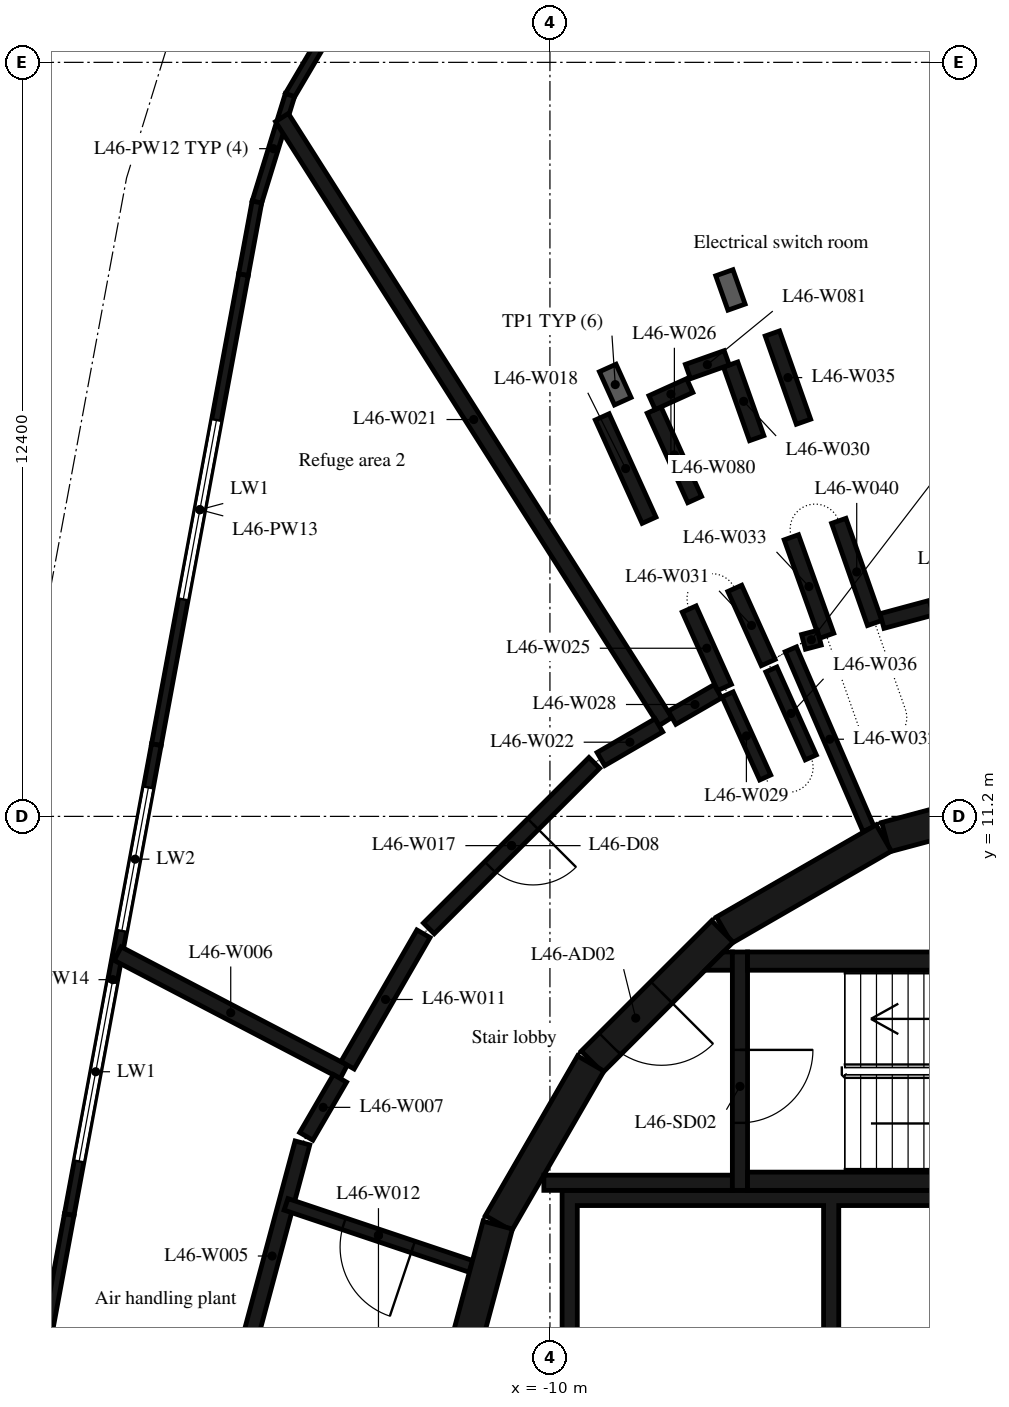
"""IFC4 building model, lengths in metres.
Left out: names, types, materials, properties, quantities, classifications, styles, units other than length and angle.
Written with IfcOpenShell. Run it as: python <this file> out.ifc"""

import sys

from ifc_helpers import new_model, si_unit, direction, frame, frame_2d, origin, place, context, subcontext, project, spatial, polyline, rectangle, outline, extrude, element, fill, save


model = new_model("IFC4")
c1 = context("Model", 3, precision=1e-05, world=origin(), true_north=direction((0.0, 1.0)))
c2 = subcontext(c1, "Body", "Model", "MODEL_VIEW")
j1 = project(units=[si_unit("LENGTHUNIT", "METRE"), si_unit("PLANEANGLEUNIT", "RADIAN")], contexts=[c1])
p1 = place(None, origin())
s1 = spatial("IfcSite", under=j1, at=p1, CompositionType="ELEMENT")
p2 = place(p1, origin())
s2 = spatial("IfcBuilding", under=s1, at=p2, CompositionType="ELEMENT")
p3 = place(p2, frame((0.0, 0.0, 183.2)))
s3 = spatial("IfcBuildingStorey", under=s2, at=p3, CompositionType="ELEMENT", Elevation=183.2)
p4 = place(p3, frame((-13.341, 24.646, 0.0), z_axis=(0.0, 0.0, 1.0), x_axis=(-0.50746464076, -0.861672581889, 0.0)))
e1 = element("IfcWall", 1, at=p4, inside=s3, PredefinedType="STANDARD", context=c2, shape_type="SweptSolid", body=[
    extrude(rectangle(XDim=1.848, YDim=0.16, at=frame_2d((0.924, 0.0))), origin(), (0.0, 0.0, 1.0), 4.75),
])
p5 = place(p3, frame((-14.275, 23.062, 0.0), z_axis=(0.0, 0.0, 1.0), x_axis=(-0.295200909257, -0.955435200929, 0.0)))
e2 = element("IfcWall", 2, at=p5, inside=s3, PredefinedType="STANDARD", context=c2, shape_type="SweptSolid", body=[
    extrude(rectangle(XDim=1.846, YDim=0.16, at=frame_2d((0.923, 0.0))), origin(), (0.0, 0.0, 1.0), 4.75),
])
p6 = place(p3, frame((-14.819, 21.303, 0.0), z_axis=(0.0, 0.0, 1.0), x_axis=(-0.182153983932, -0.983270016902, 0.0)))
e3 = element("IfcWall", 3, at=p6, inside=s3, PredefinedType="STANDARD", context=c2, shape_type="SweptSolid", body=[
    extrude(rectangle(XDim=1.216, YDim=0.16, at=frame_2d((0.608, 0.0))), origin(), (0.0, 0.0, 1.0), 4.75),
])
p7 = place(p3, frame((-15.041, 20.108, 0.0), z_axis=(0.0, 0.0, 1.0), x_axis=(-0.182238304251, -0.983254392547, 0.0)))
e4 = element("IfcWall", 4, at=p7, inside=s3, PredefinedType="STANDARD", context=c2, shape_type="SweptSolid", body=[
    extrude(rectangle(XDim=7.86, YDim=0.16, at=frame_2d((3.93, 0.0))), origin(), (0.0, 0.0, 1.0), 4.75),
])
p8 = place(p7, frame((2.43, 0.0, 1.0)))
e5 = element("IfcOpeningElement", 5, at=p8, cuts=e4, PredefinedType="OPENING", context=c2, shape_type="SweptSolid", body=[
    extrude(rectangle(XDim=3.0, YDim=2.2, at=frame_2d((1.5, 1.1))), frame((0.0, 0.09, 0.0), z_axis=(0.0, -1.0, 0.0), x_axis=(1.0, 0.0, 0.0)), (0.0, 0.0, 1.0), 0.18),
])
p9 = place(p3, frame((-16.473, 12.379, 0.0), z_axis=(0.0, 0.0, 1.0), x_axis=(-0.182232738599, -0.98325542408, 0.0)))
e6 = element("IfcWall", 6, at=p9, inside=s3, PredefinedType="STANDARD", context=c2, shape_type="SweptSolid", body=[
    extrude(rectangle(XDim=7.86, YDim=0.16, at=frame_2d((3.93, 0.0))), origin(), (0.0, 0.0, 1.0), 4.75),
])
p10 = place(p9, frame((0.715, 0.0, 1.0)))
e7 = element("IfcOpeningElement", 7, at=p10, cuts=e6, PredefinedType="OPENING", context=c2, shape_type="SweptSolid", body=[
    extrude(rectangle(XDim=2.4, YDim=2.2, at=frame_2d((1.2, 1.1))), frame((0.0, 0.09, 0.0), z_axis=(0.0, -1.0, 0.0), x_axis=(1.0, 0.0, 0.0)), (0.0, 0.0, 1.0), 0.18),
])
p11 = place(p9, frame((3.97, 0.0, 1.0)))
e8 = element("IfcOpeningElement", 8, at=p11, cuts=e6, PredefinedType="OPENING", context=c2, shape_type="SweptSolid", body=[
    extrude(rectangle(XDim=3.0, YDim=2.2, at=frame_2d((1.5, 1.1))), frame((0.0, 0.09, 0.0), z_axis=(0.0, -1.0, 0.0), x_axis=(1.0, 0.0, 0.0)), (0.0, 0.0, 1.0), 0.18),
])
p12 = place(p3, frame((-17.905, 4.651, 0.0), z_axis=(0.0, 0.0, 1.0), x_axis=(-0.182232738599, -0.98325542408, 0.0)))
e9 = element("IfcWall", 9, at=p12, inside=s3, PredefinedType="STANDARD", context=c2, shape_type="SweptSolid", body=[
    extrude(rectangle(XDim=7.86, YDim=0.16, at=frame_2d((3.93, 0.0))), origin(), (0.0, 0.0, 1.0), 4.75),
])
for number, where, z_axis, x_axis in (
    (10, (-1.55, 11.643, 0.0), (0.0, 0.0, 1.0), (-0.966, -0.259, 0.0)),
    (11, (-4.51, 10.845, 0.0), (0.0, 0.0, 1.0), (-0.866, -0.5, 0.0)),
):
    element("IfcWall", number, at=place(p3, frame(where, z_axis=z_axis, x_axis=x_axis)), inside=s3, PredefinedType="SHEAR", context=c2, shape_type="SweptSolid", body=[
        extrude(rectangle(XDim=3.033, YDim=0.5, at=frame_2d((1.516, 0.0))), origin(), (0.0, 0.0, 1.0), 4.75),
    ])
p13 = place(p3, frame((-7.164, 9.308, 0.0), z_axis=(0.0, 0.0, 1.0), x_axis=(-0.707106781187, -0.707106781187, 0.0)))
e12 = element("IfcWall", 12, at=p13, inside=s3, PredefinedType="SHEAR", context=c2, shape_type="SweptSolid", body=[
    extrude(rectangle(XDim=3.032, YDim=0.5, at=frame_2d((1.516, 0.0))), origin(), (0.0, 0.0, 1.0), 4.75),
])
p14 = place(p13, frame((1.416, 0.0, 0.0)))
e13 = element("IfcOpeningElement", 13, at=p14, cuts=e12, PredefinedType="OPENING", context=c2, shape_type="SweptSolid", body=[
    extrude(rectangle(XDim=1.2, YDim=2.1, at=frame_2d((0.6, 1.05))), frame((0.0, 0.26, 0.0), z_axis=(0.0, -1.0, 0.0), x_axis=(1.0, 0.0, 0.0)), (0.0, 0.0, 1.0), 0.52),
])
for number, where, z_axis, x_axis in (
    (14, (-9.329, 7.137, 0.0), (0.0, 0.0, 1.0), (-0.5, -0.866, 0.0)),
    (15, (-10.858, 4.479, 0.0), (0.0, 0.0, 1.0), (-0.259, -0.966, 0.0)),
):
    element("IfcWall", number, at=place(p3, frame(where, z_axis=z_axis, x_axis=x_axis)), inside=s3, PredefinedType="SHEAR", context=c2, shape_type="SweptSolid", body=[
        extrude(rectangle(XDim=3.033, YDim=0.5, at=frame_2d((1.516, 0.0))), origin(), (0.0, 0.0, 1.0), 4.75),
    ])
for number, where, z_axis, x_axis in (
    (16, (-6.75, 5.2, 0.0), (0.0, 0.0, 1.0), (1.0, 0.0, 0.0)),
    (17, (-6.75, 8.82, 0.0), (0.0, 0.0, 1.0), (1.0, 0.0, 0.0)),
):
    element("IfcWall", number, at=place(p3, frame(where, z_axis=z_axis, x_axis=x_axis)), inside=s3, PredefinedType="SHEAR", context=c2, shape_type="SweptSolid", body=[
        extrude(rectangle(XDim=6.75, YDim=0.3, at=frame_2d((3.375, 0.0))), origin(), (0.0, 0.0, 1.0), 4.75),
    ])
p15 = place(p3, frame((-6.875, 8.97, 0.0), z_axis=(0.0, 0.0, 1.0), x_axis=(0.0, -1.0, 0.0)))
e18 = element("IfcWall", 18, at=p15, inside=s3, PredefinedType="SHEAR", context=c2, shape_type="SweptSolid", body=[
    extrude(rectangle(XDim=3.92, YDim=0.25, at=frame_2d((1.96, 0.0))), origin(), (0.0, 0.0, 1.0), 4.75),
])
p16 = place(p15, frame((1.61, 0.0, 0.0)))
e19 = element("IfcOpeningElement", 19, at=p16, cuts=e18, PredefinedType="OPENING", context=c2, shape_type="SweptSolid", body=[
    extrude(rectangle(XDim=1.2, YDim=2.1, at=frame_2d((0.6, 1.05))), frame((0.0, 0.135, 0.0), z_axis=(0.0, -1.0, 0.0), x_axis=(1.0, 0.0, 0.0)), (0.0, 0.0, 1.0), 0.27),
])
p17 = place(p3, frame((-7.0, 5.175, 0.0), z_axis=(0.0, 0.0, 1.0), x_axis=(-1.0, 0.0, 0.0)))
e20 = element("IfcWall", 20, at=p17, inside=s3, PredefinedType="SHEAR", context=c2, shape_type="SweptSolid", body=[
    extrude(rectangle(XDim=3.1, YDim=0.25, at=frame_2d((1.55, 0.0))), origin(), (0.0, 0.0, 1.0), 4.75),
])
p18 = place(p3, origin())
e21 = element("IfcWall", 21, at=p18, inside=s3, PredefinedType="SHEAR", context=c2, shape_type="SweptSolid", body=[
    extrude(outline(polyline([(-7.148, 8.97), (-7.0, 8.97), (-7.0, 8.67), (-7.448, 8.67), (-7.148, 8.97)])), origin(), (0.0, 0.0, 1.0), 4.75),
])
p19 = place(p3, origin())
e22 = element("IfcWall", 22, at=p19, inside=s3, PredefinedType="SHEAR", context=c2, shape_type="SweptSolid", body=[
    extrude(outline(polyline([(-9.55, 4.8), (-5.5, 4.8), (-5.5, 1.9), (-5.25, 1.9), (-5.25, 4.8), (-1.2, 4.8), (-1.2, 1.9), (-0.95, 1.9), (-0.95, 4.8), (0.95, 4.8), (0.95, 1.9), (1.2, 1.9), (1.2, 4.8), (3.1, 4.8), (3.1, 1.9), (3.35, 1.9), (3.35, 4.8), (5.25, 4.8), (5.25, 1.9), (5.5, 1.9), (5.5, 4.8), (7.4, 4.8), (7.4, 1.9), (7.65, 1.9), (7.65, 4.8), (9.55, 4.8), (9.55, 1.9), (9.8, 1.9), (9.8, 4.8), (9.8, 5.05), (-9.8, 5.05), (-9.8, 4.8), (-9.8, 1.9), (-9.55, 1.9), (-9.55, 4.8)])), origin(), (0.0, 0.0, 1.0), 4.75),
])
p20 = place(p3, frame((-14.07, 5.83, 0.0), z_axis=(0.0, 0.0, 1.0), x_axis=(-0.259059323171, -0.965861411942, 0.0)))
e23 = element("IfcWall", 23, at=p20, inside=s3, PredefinedType="PARTITIONING", context=c2, shape_type="SweptSolid", body=[
    extrude(rectangle(XDim=3.851, YDim=0.25, at=frame_2d((1.925, 0.0))), origin(), (0.0, 0.0, 1.0), 4.75),
])
p21 = place(p3, frame((-13.39, 7.0, 0.0), z_axis=(0.0, 0.0, 1.0), x_axis=(-0.88635027374, 0.46301532614, 0.0)))
e24 = element("IfcWall", 24, at=p21, inside=s3, PredefinedType="PARTITIONING", context=c2, shape_type="SweptSolid", body=[
    extrude(rectangle(XDim=4.196, YDim=0.25, at=frame_2d((2.098, 0.0))), origin(), (0.0, 0.0, 1.0), 4.75),
])
p22 = place(p3, frame((-13.453, 6.892, 0.0), z_axis=(0.0, 0.0, 1.0), x_axis=(-0.502370413152, -0.864652512857, 0.0)))
e25 = element("IfcWall", 25, at=p22, inside=s3, PredefinedType="PARTITIONING", context=c2, shape_type="SweptSolid", body=[
    extrude(rectangle(XDim=1.103, YDim=0.25, at=frame_2d((0.552, 0.0))), origin(), (0.0, 0.0, 1.0), 4.75),
])
p23 = place(p3, frame((-12.08, 9.27, 0.0), z_axis=(0.0, 0.0, 1.0), x_axis=(-0.499821239653, -0.866128586522, 0.0)))
e26 = element("IfcWall", 26, at=p23, inside=s3, PredefinedType="PARTITIONING", context=c2, shape_type="SweptSolid", body=[
    extrude(rectangle(XDim=2.496, YDim=0.25, at=frame_2d((1.248, 0.0))), origin(), (0.0, 0.0, 1.0), 4.75),
])
p24 = place(p3, frame((-11.3, 3.8, 0.0), z_axis=(0.0, 0.0, 1.0), x_axis=(-0.94805712629, 0.318100118345, 0.0)))
e27 = element("IfcWall", 27, at=p24, inside=s3, PredefinedType="PARTITIONING", context=c2, shape_type="SweptSolid", body=[
    extrude(rectangle(XDim=3.207, YDim=0.2, at=frame_2d((1.603, 0.0))), origin(), (0.0, 0.0, 1.0), 4.75),
])
p25 = place(p24, frame((1.003, 0.0, 0.0)))
e28 = element("IfcOpeningElement", 28, at=p25, cuts=e27, PredefinedType="OPENING", context=c2, shape_type="SweptSolid", body=[
    extrude(rectangle(XDim=1.2, YDim=2.1, at=frame_2d((0.6, 1.05))), frame((0.0, 0.11, 0.0), z_axis=(0.0, -1.0, 0.0), x_axis=(1.0, 0.0, 0.0)), (0.0, 0.0, 1.0), 0.22),
])
p26 = place(p3, frame((-9.27, 12.08, 0.0), z_axis=(0.0, 0.0, 1.0), x_axis=(-0.707106781187, -0.707106781187, 0.0)))
e29 = element("IfcWall", 29, at=p26, inside=s3, PredefinedType="PARTITIONING", context=c2, shape_type="SweptSolid", body=[
    extrude(rectangle(XDim=3.849, YDim=0.25, at=frame_2d((1.925, 0.0))), origin(), (0.0, 0.0, 1.0), 4.75),
])
p27 = place(p26, frame((1.425, 0.0, 0.0)))
e30 = element("IfcOpeningElement", 30, at=p27, cuts=e29, PredefinedType="OPENING", context=c2, shape_type="SweptSolid", body=[
    extrude(rectangle(XDim=1.0, YDim=2.1, at=frame_2d((0.5, 1.05))), frame((0.0, 0.135, 0.0), z_axis=(0.0, -1.0, 0.0), x_axis=(1.0, 0.0, 0.0)), (0.0, 0.0, 1.0), 0.27),
])
p28 = place(p3, frame((-9.14, 17.77, 0.0), z_axis=(0.0, 0.0, 1.0), x_axis=(0.412501408044, -0.910956962958, 0.0)))
e31 = element("IfcWall", 31, at=p28, inside=s3, PredefinedType="PARTITIONING", context=c2, shape_type="SweptSolid", body=[
    extrude(rectangle(XDim=1.866, YDim=0.25, at=frame_2d((0.933, 0.0))), origin(), (0.0, 0.0, 1.0), 4.75),
])
p29 = place(p3, frame((-8.1, 12.76, 0.0), z_axis=(0.0, 0.0, 1.0), x_axis=(-0.536060247706, 0.844179726616, 0.0)))
e32 = element("IfcWall", 32, at=p29, inside=s3, PredefinedType="PARTITIONING", context=c2, shape_type="SweptSolid", body=[
    extrude(rectangle(XDim=11.766, YDim=0.25, at=frame_2d((5.883, 0.0))), origin(), (0.0, 0.0, 1.0), 4.75),
])
p30 = place(p3, frame((-8.208, 12.697, 0.0), z_axis=(0.0, 0.0, 1.0), x_axis=(-0.86455637663, -0.502535841138, 0.0)))
e33 = element("IfcWall", 33, at=p30, inside=s3, PredefinedType="PARTITIONING", context=c2, shape_type="SweptSolid", body=[
    extrude(rectangle(XDim=1.103, YDim=0.25, at=frame_2d((0.552, 0.0))), origin(), (0.0, 0.0, 1.0), 4.75),
])
p31 = place(p3, frame((-7.71, 14.61, 0.0), z_axis=(0.0, 0.0, 1.0), x_axis=(0.410106293635, -0.912037733825, 0.0)))
e34 = element("IfcWall", 34, at=p31, inside=s3, PredefinedType="PARTITIONING", context=c2, shape_type="SweptSolid", body=[
    extrude(rectangle(XDim=1.415, YDim=0.25, at=frame_2d((0.707, 0.0))), origin(), (0.0, 0.0, 1.0), 4.75),
])
p32 = place(p3, frame((-7.62, 16.41, 0.0), z_axis=(0.0, 0.0, 1.0), x_axis=(-0.412505188341, 0.910955251147, 0.0)))
e35 = element("IfcWall", 35, at=p32, inside=s3, PredefinedType="PARTITIONING", context=c2, shape_type="SweptSolid", body=[
    extrude(rectangle(XDim=1.616, YDim=0.25, at=frame_2d((0.808, 0.0))), origin(), (0.0, 0.0, 1.0), 4.75),
])
p33 = place(p3, frame((-7.238, 13.258, 0.0), z_axis=(0.0, 0.0, 1.0), x_axis=(-0.865989304205, -0.500062521093, 0.0)))
e36 = element("IfcWall", 36, at=p33, inside=s3, PredefinedType="PARTITIONING", context=c2, shape_type="SweptSolid", body=[
    extrude(rectangle(XDim=0.87, YDim=0.25, at=frame_2d((0.435, 0.0))), origin(), (0.0, 0.0, 1.0), 4.75),
])
p34 = place(p3, frame((-7.078, 13.206, 0.0), z_axis=(0.0, 0.0, 1.0), x_axis=(0.412428521681, -0.910989963997, 0.0)))
e37 = element("IfcWall", 37, at=p34, inside=s3, PredefinedType="PARTITIONING", context=c2, shape_type="SweptSolid", body=[
    extrude(rectangle(XDim=1.5, YDim=0.2, at=frame_2d((0.75, 0.0))), origin(), (0.0, 0.0, 1.0), 4.75),
])
p35 = place(p3, frame((-7.029, 18.631, 0.0), z_axis=(0.0, 0.0, 1.0), x_axis=(0.333903428613, -0.942607288514, 0.0)))
e38 = element("IfcWall", 38, at=p35, inside=s3, PredefinedType="PARTITIONING", context=c2, shape_type="SweptSolid", body=[
    extrude(rectangle(XDim=1.285, YDim=0.25, at=frame_2d((0.642, 0.0))), origin(), (0.0, 0.0, 1.0), 4.75),
])
p36 = place(p3, frame((-6.41, 13.73, 0.0), z_axis=(0.0, 0.0, 1.0), x_axis=(-0.411024519378, 0.911624289096, 0.0)))
e39 = element("IfcWall", 39, at=p36, inside=s3, PredefinedType="PARTITIONING", context=c2, shape_type="SweptSolid", body=[
    extrude(rectangle(XDim=1.338, YDim=0.25, at=frame_2d((0.669, 0.0))), origin(), (0.0, 0.0, 1.0), 4.75),
])
p37 = place(p3, frame((-6.039, 13.948, 0.0), z_axis=(0.0, 0.0, 1.0), x_axis=(0.396880096663, -0.917870464103, 0.0)))
e40 = element("IfcWall", 40, at=p37, inside=s3, PredefinedType="PARTITIONING", context=c2, shape_type="SweptSolid", body=[
    extrude(rectangle(XDim=3.222, YDim=0.2, at=frame_2d((1.611, 0.0))), origin(), (0.0, 0.0, 1.0), 4.75),
])
p38 = place(p3, frame((-6.03, 15.79, 0.0), z_axis=(0.0, 0.0, 1.0), x_axis=(0.337091235246, -0.941471985308, 0.0)))
e41 = element("IfcWall", 41, at=p38, inside=s3, PredefinedType="PARTITIONING", context=c2, shape_type="SweptSolid", body=[
    extrude(rectangle(XDim=1.721, YDim=0.25, at=frame_2d((0.86, 0.0))), origin(), (0.0, 0.0, 1.0), 4.75),
])
p39 = place(p3, frame((-5.83, 17.69, 0.0), z_axis=(0.0, 0.0, 1.0), x_axis=(-0.332455036473, 0.94311910633, 0.0)))
e42 = element("IfcWall", 42, at=p39, inside=s3, PredefinedType="PARTITIONING", context=c2, shape_type="SweptSolid", body=[
    extrude(rectangle(XDim=1.539, YDim=0.25, at=frame_2d((0.77, 0.0))), origin(), (0.0, 0.0, 1.0), 4.75),
])
p40 = place(p3, frame((-5.71, 12.17, 0.0), z_axis=(0.0, 0.0, 1.0), x_axis=(-0.40942296047, 0.912344693326, 0.0)))
e43 = element("IfcWall", 43, at=p40, inside=s3, PredefinedType="PARTITIONING", context=c2, shape_type="SweptSolid", body=[
    extrude(rectangle(XDim=1.585, YDim=0.2, at=frame_2d((0.792, 0.0))), origin(), (0.0, 0.0, 1.0), 4.75),
])
p41 = place(p3, frame((-5.571, 14.138, 0.0), z_axis=(0.0, 0.0, 1.0), x_axis=(-0.967180624685, -0.254089825129, 0.0)))
e44 = element("IfcWall", 44, at=p41, inside=s3, PredefinedType="PARTITIONING", context=c2, shape_type="SweptSolid", body=[
    extrude(rectangle(XDim=0.268, YDim=0.25, at=frame_2d((0.134, 0.0))), origin(), (0.0, 0.0, 1.0), 4.75),
])
p42 = place(p3, frame((-4.66, 14.38, 0.0), z_axis=(0.0, 0.0, 1.0), x_axis=(-0.331363959676, 0.943503008065, 0.0)))
e45 = element("IfcWall", 45, at=p42, inside=s3, PredefinedType="PARTITIONING", context=c2, shape_type="SweptSolid", body=[
    extrude(rectangle(XDim=1.781, YDim=0.25, at=frame_2d((0.89, 0.0))), origin(), (0.0, 0.0, 1.0), 4.75),
])
p43 = place(p3, frame((-1.99, 15.1, 0.0), z_axis=(0.0, 0.0, 1.0), x_axis=(-0.965506757826, -0.260377995598, 0.0)))
e46 = element("IfcWall", 46, at=p43, inside=s3, PredefinedType="PARTITIONING", context=c2, shape_type="SweptSolid", body=[
    extrude(rectangle(XDim=2.64, YDim=0.25, at=frame_2d((1.32, 0.0))), origin(), (0.0, 0.0, 1.0), 4.75),
])
p44 = place(p43, frame((0.82, 0.0, 0.0)))
e47 = element("IfcOpeningElement", 47, at=p44, cuts=e46, PredefinedType="OPENING", context=c2, shape_type="SweptSolid", body=[
    extrude(rectangle(XDim=1.0, YDim=2.1, at=frame_2d((0.5, 1.05))), frame((0.0, 0.135, 0.0), z_axis=(0.0, -1.0, 0.0), x_axis=(1.0, 0.0, 0.0)), (0.0, 0.0, 1.0), 0.27),
])
p45 = place(p3, frame((-7.701, 18.285, 0.0), z_axis=(0.0, 0.0, 1.0), x_axis=(-0.910931266963, -0.412558149681, 0.0)))
e48 = element("IfcWall", 48, at=p45, inside=s3, PredefinedType="PARTITIONING", context=c2, shape_type="SweptSolid", body=[
    extrude(rectangle(XDim=0.68, YDim=0.25, at=frame_2d((0.34, 0.0))), origin(), (0.0, 0.0, 1.0), 4.75),
])
p46 = place(p3, frame((-7.093, 18.741, 0.0), z_axis=(0.0, 0.0, 1.0), x_axis=(-0.942636688844, -0.333820420054, 0.0)))
e49 = element("IfcWall", 49, at=p46, inside=s3, PredefinedType="PARTITIONING", context=c2, shape_type="SweptSolid", body=[
    extrude(rectangle(XDim=0.677, YDim=0.25, at=frame_2d((0.338, 0.0))), origin(), (0.0, 0.0, 1.0), 4.75),
])
p47 = place(p8, origin())
e50 = element("IfcWindow", 50, at=p47, inside=s3, PartitioningType="SINGLE_PANEL", PredefinedType="WINDOW", context=c2, shape_type="SweptSolid", body=[
    extrude(rectangle(XDim=3.0, YDim=2.2, at=frame_2d((1.5, 1.1))), frame((0.0, 0.03, 0.0), z_axis=(0.0, -1.0, 0.0), x_axis=(1.0, 0.0, 0.0)), (0.0, 0.0, 1.0), 0.06),
])
fill(e5, e50)
p48 = place(p10, origin())
e51 = element("IfcWindow", 51, at=p48, inside=s3, PartitioningType="SINGLE_PANEL", PredefinedType="WINDOW", context=c2, shape_type="SweptSolid", body=[
    extrude(rectangle(XDim=2.4, YDim=2.2, at=frame_2d((1.2, 1.1))), frame((0.0, 0.03, 0.0), z_axis=(0.0, -1.0, 0.0), x_axis=(1.0, 0.0, 0.0)), (0.0, 0.0, 1.0), 0.06),
])
fill(e7, e51)
p49 = place(p11, origin())
e52 = element("IfcWindow", 52, at=p49, inside=s3, PartitioningType="SINGLE_PANEL", PredefinedType="WINDOW", context=c2, shape_type="SweptSolid", body=[
    extrude(rectangle(XDim=3.0, YDim=2.2, at=frame_2d((1.5, 1.1))), frame((0.0, 0.03, 0.0), z_axis=(0.0, -1.0, 0.0), x_axis=(1.0, 0.0, 0.0)), (0.0, 0.0, 1.0), 0.06),
])
fill(e8, e52)
p50 = place(p16, origin())
e53 = element("IfcDoor", 53, at=p50, inside=s3, OperationType="SINGLE_SWING_LEFT", PredefinedType="DOOR", context=c2, shape_type="SweptSolid", body=[
    extrude(rectangle(XDim=1.2, YDim=2.1, at=frame_2d((0.6, 1.05))), frame((0.0, 0.025, 0.0), z_axis=(0.0, -1.0, 0.0), x_axis=(1.0, 0.0, 0.0)), (0.0, 0.0, 1.0), 0.05),
])
fill(e19, e53)
p51 = place(p14, origin())
e54 = element("IfcDoor", 54, at=p51, inside=s3, OperationType="SINGLE_SWING_RIGHT", PredefinedType="DOOR", context=c2, shape_type="SweptSolid", body=[
    extrude(rectangle(XDim=1.2, YDim=2.1, at=frame_2d((0.6, 1.05))), frame((0.0, 0.025, 0.0), z_axis=(0.0, -1.0, 0.0), x_axis=(1.0, 0.0, 0.0)), (0.0, 0.0, 1.0), 0.05),
])
fill(e13, e54)
p52 = place(p27, origin())
e55 = element("IfcDoor", 55, at=p52, inside=s3, OperationType="SINGLE_SWING_LEFT", PredefinedType="DOOR", context=c2, shape_type="SweptSolid", body=[
    extrude(rectangle(XDim=1.0, YDim=2.1, at=frame_2d((0.5, 1.05))), frame((0.0, 0.025, 0.0), z_axis=(0.0, -1.0, 0.0), x_axis=(1.0, 0.0, 0.0)), (0.0, 0.0, 1.0), 0.05),
])
fill(e30, e55)
p53 = place(p25, origin())
e56 = element("IfcDoor", 56, at=p53, inside=s3, OperationType="SINGLE_SWING_LEFT", PredefinedType="DOOR", context=c2, shape_type="SweptSolid", body=[
    extrude(rectangle(XDim=1.2, YDim=2.1, at=frame_2d((0.6, 1.05))), frame((0.0, 0.025, 0.0), z_axis=(0.0, -1.0, 0.0), x_axis=(1.0, 0.0, 0.0)), (0.0, 0.0, 1.0), 0.05),
])
fill(e28, e56)
save(model, sys.argv[1])
